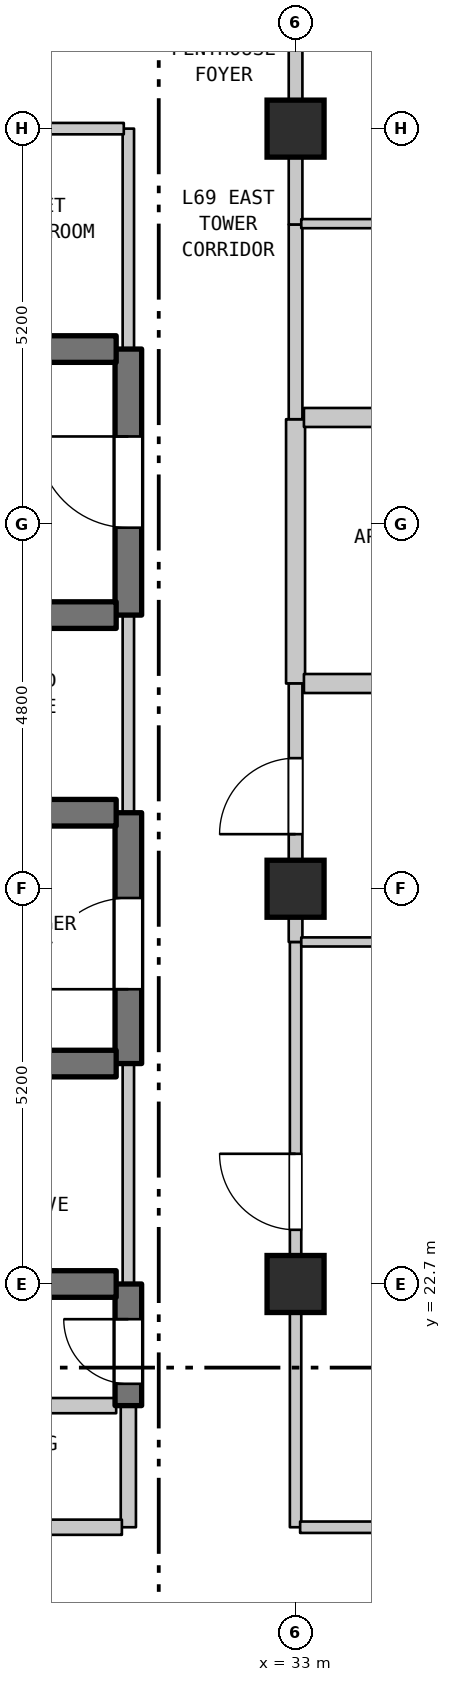
"""IFC4 building model, lengths in metres.
Left out: names, types, materials, properties, quantities, classifications, styles, units other than length and angle.
Written with IfcOpenShell. Run it as: python <this file> out.ifc"""

import sys

from ifc_helpers import new_model, si_unit, direction, frame, frame_2d, origin, origin_2d, place, context, subcontext, project, spatial, rectangle, extrude, element, fill, save


model = new_model("IFC4")
c1 = context("Model", 3, precision=1e-05, world=origin(), true_north=direction((0.0, 1.0)))
c2 = subcontext(c1, "Body", "Model", "MODEL_VIEW")
j1 = project(units=[si_unit("LENGTHUNIT", "METRE"), si_unit("PLANEANGLEUNIT", "RADIAN")], contexts=[c1])
p1 = place(None, origin())
s1 = spatial("IfcSite", under=j1, at=p1, CompositionType="ELEMENT")
p2 = place(p1, origin())
s2 = spatial("IfcBuilding", under=s1, at=p2, CompositionType="ELEMENT")
p3 = place(p2, frame((0.0, 0.0, 276.9)))
s3 = spatial("IfcBuildingStorey", under=s2, at=p3, CompositionType="ELEMENT", Elevation=276.9)
for number, where, z_axis, x_axis in (
    (1, (33.0, 22.7, 0.0), (0.0, 0.0, 1.0), (1.0, 0.0, 0.0)),
    (2, (33.0, 27.9, 0.0), (0.0, 0.0, 1.0), (1.0, 0.0, 0.0)),
    (3, (33.0, 37.9, 0.0), (0.0, 0.0, 1.0), (1.0, 0.0, 0.0)),
):
    element("IfcColumn", number, at=place(p3, frame(where, z_axis=z_axis, x_axis=x_axis)), inside=s3, PredefinedType="COLUMN", context=c2, shape_type="SweptSolid", body=[
        extrude(rectangle(XDim=0.75, YDim=0.75, at=origin_2d()), origin(), (0.0, 0.0, 1.0), 3.7),
    ])
p4 = place(p3, frame((30.8, 19.5, 0.0), z_axis=(0.0, 0.0, 1.0), x_axis=(0.0, 1.0, 0.0)))
e4 = element("IfcWall", 4, at=p4, inside=s3, PredefinedType="STANDARD", context=c2, shape_type="SweptSolid", body=[
    extrude(rectangle(XDim=1.6, YDim=0.2, at=frame_2d((0.8, 0.0))), origin(), (0.0, 0.0, 1.0), 3.39),
])
p5 = place(p3, frame((30.8, 21.1, 0.0), z_axis=(0.0, 0.0, 1.0), x_axis=(0.0, 1.0, 0.0)))
e5 = element("IfcWall", 5, at=p5, inside=s3, PredefinedType="SHEAR", context=c2, shape_type="SweptSolid", body=[
    extrude(rectangle(XDim=1.6, YDim=0.35, at=frame_2d((0.8, 0.0))), origin(), (0.0, 0.0, 1.0), 3.39),
])
p6 = place(p5, frame((0.287, 0.0, 0.0)))
e6 = element("IfcOpeningElement", 6, at=p6, cuts=e5, PredefinedType="OPENING", context=c2, shape_type="SweptSolid", body=[
    extrude(rectangle(XDim=0.85, YDim=2.1, at=frame_2d((0.425, 1.05))), frame((0.0, 0.185, 0.0), z_axis=(0.0, -1.0, 0.0), x_axis=(1.0, 0.0, 0.0)), (0.0, 0.0, 1.0), 0.37),
])
p7 = place(p3, frame((30.8, 22.7, 0.0), z_axis=(0.0, 0.0, 1.0), x_axis=(0.0, 1.0, 0.0)))
e7 = element("IfcWall", 7, at=p7, inside=s3, PredefinedType="STANDARD", context=c2, shape_type="SweptSolid", body=[
    extrude(rectangle(XDim=2.9, YDim=0.15, at=frame_2d((1.45, 0.0))), origin(), (0.0, 0.0, 1.0), 3.39),
])
p8 = place(p3, frame((30.8, 25.6, 0.0), z_axis=(0.0, 0.0, 1.0), x_axis=(0.0, 1.0, 0.0)))
e8 = element("IfcWall", 8, at=p8, inside=s3, PredefinedType="SHEAR", context=c2, shape_type="SweptSolid", body=[
    extrude(rectangle(XDim=3.3, YDim=0.35, at=frame_2d((1.65, 0.0))), origin(), (0.0, 0.0, 1.0), 3.39),
])
p9 = place(p8, frame((0.978, 0.0, 0.0)))
e9 = element("IfcOpeningElement", 9, at=p9, cuts=e8, PredefinedType="OPENING", context=c2, shape_type="SweptSolid", body=[
    extrude(rectangle(XDim=1.2, YDim=2.2, at=frame_2d((0.6, 1.1))), frame((0.0, 0.185, 0.0), z_axis=(0.0, -1.0, 0.0), x_axis=(1.0, 0.0, 0.0)), (0.0, 0.0, 1.0), 0.37),
])
p10 = place(p3, frame((30.8, 28.9, 0.0), z_axis=(0.0, 0.0, 1.0), x_axis=(0.0, 1.0, 0.0)))
e10 = element("IfcWall", 10, at=p10, inside=s3, PredefinedType="STANDARD", context=c2, shape_type="SweptSolid", body=[
    extrude(rectangle(XDim=2.6, YDim=0.15, at=frame_2d((1.3, 0.0))), origin(), (0.0, 0.0, 1.0), 3.39),
])
p11 = place(p3, frame((30.8, 31.5, 0.0), z_axis=(0.0, 0.0, 1.0), x_axis=(0.0, 1.0, 0.0)))
e11 = element("IfcWall", 11, at=p11, inside=s3, PredefinedType="SHEAR", context=c2, shape_type="SweptSolid", body=[
    extrude(rectangle(XDim=3.5, YDim=0.35, at=frame_2d((1.75, 0.0))), origin(), (0.0, 0.0, 1.0), 3.39),
])
p12 = place(p11, frame((1.15, 0.0, 0.0)))
e12 = element("IfcOpeningElement", 12, at=p12, cuts=e11, PredefinedType="OPENING", context=c2, shape_type="SweptSolid", body=[
    extrude(rectangle(XDim=1.2, YDim=2.2, at=frame_2d((0.6, 1.1))), frame((0.0, 0.185, 0.0), z_axis=(0.0, -1.0, 0.0), x_axis=(1.0, 0.0, 0.0)), (0.0, 0.0, 1.0), 0.37),
])
p13 = place(p3, frame((30.8, 35.0, 0.0), z_axis=(0.0, 0.0, 1.0), x_axis=(0.0, 1.0, 0.0)))
e13 = element("IfcWall", 13, at=p13, inside=s3, PredefinedType="STANDARD", context=c2, shape_type="SweptSolid", body=[
    extrude(rectangle(XDim=2.9, YDim=0.15, at=frame_2d((1.45, 0.0))), origin(), (0.0, 0.0, 1.0), 3.39),
])
p14 = place(p3, frame((33.0, 19.5, 0.0), z_axis=(0.0, 0.0, 1.0), x_axis=(0.0, 1.0, 0.0)))
e14 = element("IfcWall", 14, at=p14, inside=s3, PredefinedType="STANDARD", context=c2, shape_type="SweptSolid", body=[
    extrude(rectangle(XDim=7.7, YDim=0.15, at=frame_2d((3.85, 0.0))), origin(), (0.0, 0.0, 1.0), 3.1),
])
p15 = place(p14, frame((3.913, 0.0, 0.0)))
e15 = element("IfcOpeningElement", 15, at=p15, cuts=e14, PredefinedType="OPENING", context=c2, shape_type="SweptSolid", body=[
    extrude(rectangle(XDim=1.0, YDim=2.15, at=frame_2d((0.5, 1.075))), frame((0.0, 0.085, 0.0), z_axis=(0.0, -1.0, 0.0), x_axis=(1.0, 0.0, 0.0)), (0.0, 0.0, 1.0), 0.17),
])
p16 = place(p3, frame((33.0, 27.2, 0.0), z_axis=(0.0, 0.0, 1.0), x_axis=(0.0, 1.0, 0.0)))
e16 = element("IfcWall", 16, at=p16, inside=s3, PredefinedType="STANDARD", context=c2, shape_type="SweptSolid", body=[
    extrude(rectangle(XDim=0.7, YDim=0.18, at=frame_2d((0.35, 0.0))), origin(), (0.0, 0.0, 1.0), 3.1),
])
p17 = place(p3, frame((33.0, 30.6, 0.0), z_axis=(0.0, 0.0, 1.0), x_axis=(0.0, 1.0, 0.0)))
e17 = element("IfcWall", 17, at=p17, inside=s3, PredefinedType="STANDARD", context=c2, shape_type="SweptSolid", body=[
    extrude(rectangle(XDim=3.477, YDim=0.25, at=frame_2d((1.738, 0.0))), origin(), (0.0, 0.0, 1.0), 2.89),
])
p18 = place(p3, frame((33.0, 34.077, 0.0), z_axis=(0.0, 0.0, 1.0), x_axis=(0.0, 1.0, 0.0)))
e18 = element("IfcWall", 18, at=p18, inside=s3, PredefinedType="STANDARD", context=c2, shape_type="SweptSolid", body=[
    extrude(rectangle(XDim=2.562, YDim=0.18, at=frame_2d((1.281, 0.0))), origin(), (0.0, 0.0, 1.0), 2.89),
])
p19 = place(p3, frame((33.0, 36.639, 0.0), z_axis=(0.0, 0.0, 1.0), x_axis=(0.0, 1.0, 0.0)))
e19 = element("IfcWall", 19, at=p19, inside=s3, PredefinedType="STANDARD", context=c2, shape_type="SweptSolid", body=[
    extrude(rectangle(XDim=1.261, YDim=0.18, at=frame_2d((0.63, 0.0))), origin(), (0.0, 0.0, 1.0), 2.89),
])
p20 = place(p3, frame((27.285, 19.5, 0.0), z_axis=(0.0, 0.0, 1.0), x_axis=(1.0, 0.0, 0.0)))
e20 = element("IfcWall", 20, at=p20, inside=s3, PredefinedType="STANDARD", context=c2, shape_type="SweptSolid", body=[
    extrude(rectangle(XDim=3.43, YDim=0.2, at=frame_2d((1.715, 0.0))), origin(), (0.0, 0.0, 1.0), 3.39),
])
p21 = place(p20, frame((1.192, 0.0, 0.0)))
e21 = element("IfcOpeningElement", 21, at=p21, cuts=e20, PredefinedType="OPENING", context=c2, shape_type="SweptSolid", body=[
    extrude(rectangle(XDim=0.9, YDim=2.15, at=frame_2d((0.45, 1.075))), frame((0.0, 0.11, 0.0), z_axis=(0.0, -1.0, 0.0), x_axis=(1.0, 0.0, 0.0)), (0.0, 0.0, 1.0), 0.22),
])
p22 = place(p3, frame((33.06, 19.5, 0.0), z_axis=(0.0, 0.0, 1.0), x_axis=(1.0, 0.0, 0.0)))
e22 = element("IfcWall", 22, at=p22, inside=s3, PredefinedType="STANDARD", context=c2, shape_type="SweptSolid", body=[
    extrude(rectangle(XDim=8.323, YDim=0.15, at=frame_2d((4.162, 0.0))), origin(), (0.0, 0.0, 1.0), 3.39),
])
p23 = place(p22, frame((3.583, 0.0, 0.0)))
e23 = element("IfcOpeningElement", 23, at=p23, cuts=e22, PredefinedType="OPENING", context=c2, shape_type="SweptSolid", body=[
    extrude(rectangle(XDim=1.0, YDim=2.15, at=frame_2d((0.5, 1.075))), frame((0.0, 0.085, 0.0), z_axis=(0.0, -1.0, 0.0), x_axis=(1.0, 0.0, 0.0)), (0.0, 0.0, 1.0), 0.17),
])
p24 = place(p3, frame((27.285, 21.1, 0.0), z_axis=(0.0, 0.0, 1.0), x_axis=(1.0, 0.0, 0.0)))
e24 = element("IfcWall", 24, at=p24, inside=s3, PredefinedType="STANDARD", context=c2, shape_type="SweptSolid", body=[
    extrude(rectangle(XDim=3.355, YDim=0.2, at=frame_2d((1.677, 0.0))), origin(), (0.0, 0.0, 1.0), 3.39),
])
p25 = place(p3, frame((27.46, 22.7, 0.0), z_axis=(0.0, 0.0, 1.0), x_axis=(1.0, 0.0, 0.0)))
e25 = element("IfcWall", 25, at=p25, inside=s3, PredefinedType="SHEAR", context=c2, shape_type="SweptSolid", body=[
    extrude(rectangle(XDim=3.18, YDim=0.35, at=frame_2d((1.59, 0.0))), origin(), (0.0, 0.0, 1.0), 3.39),
])
p26 = place(p3, frame((27.46, 25.6, 0.0), z_axis=(0.0, 0.0, 1.0), x_axis=(1.0, 0.0, 0.0)))
e26 = element("IfcWall", 26, at=p26, inside=s3, PredefinedType="SHEAR", context=c2, shape_type="SweptSolid", body=[
    extrude(rectangle(XDim=3.18, YDim=0.35, at=frame_2d((1.59, 0.0))), origin(), (0.0, 0.0, 1.0), 3.39),
])
p27 = place(p26, frame((1.115, 0.0, 0.0)))
e27 = element("IfcOpeningElement", 27, at=p27, cuts=e26, PredefinedType="OPENING", context=c2, shape_type="SweptSolid", body=[
    extrude(rectangle(XDim=0.95, YDim=2.15, at=frame_2d((0.475, 1.075))), frame((0.0, 0.185, 0.0), z_axis=(0.0, -1.0, 0.0), x_axis=(1.0, 0.0, 0.0)), (0.0, 0.0, 1.0), 0.37),
])
p28 = place(p3, frame((33.075, 27.2, 0.0), z_axis=(0.0, 0.0, 1.0), x_axis=(1.0, 0.0, 0.0)))
e28 = element("IfcWall", 28, at=p28, inside=s3, PredefinedType="PARTITIONING", context=c2, shape_type="SweptSolid", body=[
    extrude(rectangle(XDim=11.816, YDim=0.12, at=frame_2d((5.908, 0.0))), origin(), (0.0, 0.0, 1.0), 3.39),
])
p29 = place(p3, frame((27.46, 28.9, 0.0), z_axis=(0.0, 0.0, 1.0), x_axis=(1.0, 0.0, 0.0)))
e29 = element("IfcWall", 29, at=p29, inside=s3, PredefinedType="SHEAR", context=c2, shape_type="SweptSolid", body=[
    extrude(rectangle(XDim=3.18, YDim=0.35, at=frame_2d((1.59, 0.0))), origin(), (0.0, 0.0, 1.0), 3.39),
])
p30 = place(p29, frame((1.115, 0.0, 0.0)))
e30 = element("IfcOpeningElement", 30, at=p30, cuts=e29, PredefinedType="OPENING", context=c2, shape_type="SweptSolid", body=[
    extrude(rectangle(XDim=0.95, YDim=2.15, at=frame_2d((0.475, 1.075))), frame((0.0, 0.185, 0.0), z_axis=(0.0, -1.0, 0.0), x_axis=(1.0, 0.0, 0.0)), (0.0, 0.0, 1.0), 0.37),
])
p31 = place(p3, frame((33.11, 30.6, 0.0), z_axis=(0.0, 0.0, 1.0), x_axis=(1.0, 0.0, 0.0)))
e31 = element("IfcWall", 31, at=p31, inside=s3, PredefinedType="STANDARD", context=c2, shape_type="SweptSolid", body=[
    extrude(rectangle(XDim=4.36, YDim=0.25, at=frame_2d((2.18, 0.0))), origin(), (0.0, 0.0, 1.0), 3.39),
])
p32 = place(p3, frame((27.46, 31.5, 0.0), z_axis=(0.0, 0.0, 1.0), x_axis=(1.0, 0.0, 0.0)))
e32 = element("IfcWall", 32, at=p32, inside=s3, PredefinedType="SHEAR", context=c2, shape_type="SweptSolid", body=[
    extrude(rectangle(XDim=3.18, YDim=0.35, at=frame_2d((1.59, 0.0))), origin(), (0.0, 0.0, 1.0), 3.39),
])
p33 = place(p3, frame((33.11, 34.1, 0.0), z_axis=(0.0, 0.0, 1.0), x_axis=(1.0, 0.0, 0.0)))
e33 = element("IfcWall", 33, at=p33, inside=s3, PredefinedType="STANDARD", context=c2, shape_type="SweptSolid", body=[
    extrude(rectangle(XDim=4.36, YDim=0.25, at=frame_2d((2.18, 0.0))), origin(), (0.0, 0.0, 1.0), 3.39),
])
p34 = place(p3, frame((26.645, 35.0, 0.0), z_axis=(0.0, 0.0, 1.0), x_axis=(1.0, 0.0, 0.0)))
e34 = element("IfcWall", 34, at=p34, inside=s3, PredefinedType="SHEAR", context=c2, shape_type="SweptSolid", body=[
    extrude(rectangle(XDim=3.995, YDim=0.35, at=frame_2d((1.998, 0.0))), origin(), (0.0, 0.0, 1.0), 3.39),
])
p35 = place(p34, frame((1.508, 0.0, 0.0)))
e35 = element("IfcOpeningElement", 35, at=p35, cuts=e34, PredefinedType="OPENING", context=c2, shape_type="SweptSolid", body=[
    extrude(rectangle(XDim=0.95, YDim=2.15, at=frame_2d((0.475, 1.075))), frame((0.0, 0.185, 0.0), z_axis=(0.0, -1.0, 0.0), x_axis=(1.0, 0.0, 0.0)), (0.0, 0.0, 1.0), 0.37),
])
p36 = place(p3, frame((33.075, 36.65, 0.0), z_axis=(0.0, 0.0, 1.0), x_axis=(1.0, 0.0, 0.0)))
e36 = element("IfcWall", 36, at=p36, inside=s3, PredefinedType="PARTITIONING", context=c2, shape_type="SweptSolid", body=[
    extrude(rectangle(XDim=4.46, YDim=0.12, at=frame_2d((2.23, 0.0))), origin(), (0.0, 0.0, 1.0), 3.39),
])
p37 = place(p3, frame((26.645, 37.9, 0.0), z_axis=(0.0, 0.0, 1.0), x_axis=(1.0, 0.0, 0.0)))
e37 = element("IfcWall", 37, at=p37, inside=s3, PredefinedType="STANDARD", context=c2, shape_type="SweptSolid", body=[
    extrude(rectangle(XDim=4.095, YDim=0.15, at=frame_2d((2.047, 0.0))), origin(), (0.0, 0.0, 1.0), 2.89),
])
p38 = place(p3, frame((33.0, 27.9, 0.0), z_axis=(0.0, 0.0, 1.0), x_axis=(0.0, 1.0, 0.0)))
e38 = element("IfcWall", 38, at=p38, inside=s3, PredefinedType="STANDARD", context=c2, shape_type="SweptSolid", body=[
    extrude(rectangle(XDim=2.7, YDim=0.18, at=frame_2d((1.35, 0.0))), origin(), (0.0, 0.0, 1.0), 2.89),
])
p39 = place(p38, frame((0.718, 0.0, 0.0)))
e39 = element("IfcOpeningElement", 39, at=p39, cuts=e38, PredefinedType="OPENING", context=c2, shape_type="SweptSolid", body=[
    extrude(rectangle(XDim=1.0, YDim=2.15, at=frame_2d((0.5, 1.075))), frame((0.0, 0.1, 0.0), z_axis=(0.0, -1.0, 0.0), x_axis=(1.0, 0.0, 0.0)), (0.0, 0.0, 1.0), 0.2),
])
p40 = place(p3, frame((33.0, 37.9, 0.0), z_axis=(0.0, 0.0, 1.0), x_axis=(0.0, 1.0, 0.0)))
e40 = element("IfcWall", 40, at=p40, inside=s3, PredefinedType="STANDARD", context=c2, shape_type="SweptSolid", body=[
    extrude(rectangle(XDim=1.85, YDim=0.18, at=frame_2d((0.925, 0.0))), origin(), (0.0, 0.0, 1.0), 2.79),
])
p41 = place(p6, origin())
e41 = element("IfcDoor", 41, at=p41, inside=s3, OperationType="SINGLE_SWING_RIGHT", PredefinedType="DOOR", context=c2, shape_type="SweptSolid", body=[
    extrude(rectangle(XDim=0.85, YDim=2.1, at=frame_2d((0.425, 1.05))), frame((0.0, 0.025, 0.0), z_axis=(0.0, -1.0, 0.0), x_axis=(1.0, 0.0, 0.0)), (0.0, 0.0, 1.0), 0.05),
])
fill(e6, e41)
p42 = place(p9, origin())
e42 = element("IfcDoor", 42, at=p42, inside=s3, OperationType="SINGLE_SWING_LEFT", PredefinedType="DOOR", context=c2, shape_type="SweptSolid", body=[
    extrude(rectangle(XDim=1.2, YDim=2.2, at=frame_2d((0.6, 1.1))), frame((0.0, 0.025, 0.0), z_axis=(0.0, -1.0, 0.0), x_axis=(1.0, 0.0, 0.0)), (0.0, 0.0, 1.0), 0.05),
])
fill(e9, e42)
p43 = place(p12, origin())
e43 = element("IfcDoor", 43, at=p43, inside=s3, OperationType="SINGLE_SWING_RIGHT", PredefinedType="DOOR", context=c2, shape_type="SweptSolid", body=[
    extrude(rectangle(XDim=1.2, YDim=2.2, at=frame_2d((0.6, 1.1))), frame((0.0, 0.025, 0.0), z_axis=(0.0, -1.0, 0.0), x_axis=(1.0, 0.0, 0.0)), (0.0, 0.0, 1.0), 0.05),
])
fill(e12, e43)
p44 = place(p15, origin())
e44 = element("IfcDoor", 44, at=p44, inside=s3, OperationType="SINGLE_SWING_RIGHT", PredefinedType="DOOR", context=c2, shape_type="SweptSolid", body=[
    extrude(rectangle(XDim=1.0, YDim=2.15, at=frame_2d((0.5, 1.075))), frame((0.0, 0.025, 0.0), z_axis=(0.0, -1.0, 0.0), x_axis=(1.0, 0.0, 0.0)), (0.0, 0.0, 1.0), 0.05),
])
fill(e15, e44)
p45 = place(p39, origin())
e45 = element("IfcDoor", 45, at=p45, inside=s3, OperationType="SINGLE_SWING_LEFT", PredefinedType="DOOR", context=c2, shape_type="SweptSolid", body=[
    extrude(rectangle(XDim=1.0, YDim=2.15, at=frame_2d((0.5, 1.075))), frame((0.0, 0.025, 0.0), z_axis=(0.0, -1.0, 0.0), x_axis=(1.0, 0.0, 0.0)), (0.0, 0.0, 1.0), 0.05),
])
fill(e39, e45)
save(model, sys.argv[1])
